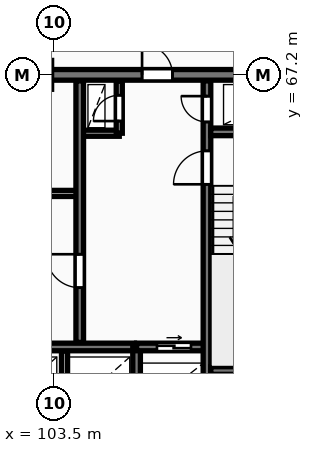
"""IFC4 building model, lengths in metres.
Left out: names, types, materials, properties, quantities, classifications, styles, units other than length and angle.
Written with IfcOpenShell. Run it as: python <this file> out.ifc"""

import sys

from ifc_helpers import new_model, si_unit, direction, frame, frame_2d, origin, place, context, subcontext, project, spatial, rectangle, extrude, element, fill, save


model = new_model("IFC4")
c1 = context("Model", 3, precision=1e-05, world=origin(), true_north=direction((0.0, 1.0)))
c2 = subcontext(c1, "Body", "Model", "MODEL_VIEW")
j1 = project(units=[si_unit("LENGTHUNIT", "METRE"), si_unit("PLANEANGLEUNIT", "RADIAN")], contexts=[c1])
p1 = place(None, origin())
s1 = spatial("IfcSite", under=j1, at=p1, CompositionType="ELEMENT")
p2 = place(p1, origin())
s2 = spatial("IfcBuilding", under=s1, at=p2, CompositionType="ELEMENT")
p3 = place(p2, frame((0.0, 0.0, 24.0)))
s3 = spatial("IfcBuildingStorey", under=s2, at=p3, CompositionType="ELEMENT", Elevation=24.0)
p4 = place(p3, frame((75.95, 67.2, 0.0), z_axis=(0.0, 0.0, 1.0), x_axis=(1.0, 0.0, 0.0)))
e1 = element("IfcWall", 1, at=p4, inside=s3, PredefinedType="SHEAR", context=c2, shape_type="SweptSolid", body=[
    extrude(rectangle(XDim=36.3, YDim=0.35, at=frame_2d((18.15, 0.0))), origin(), (0.0, 0.0, 1.0), 3.25),
])
p5 = place(p4, frame((5.25, 0.0, 0.0)))
e2 = element("IfcOpeningElement", 2, at=p5, cuts=e1, PredefinedType="OPENING", context=c2, shape_type="SweptSolid", body=[
    extrude(rectangle(XDim=1.0, YDim=2.15, at=frame_2d((0.5, 1.075))), frame((0.0, 0.185, 0.0), z_axis=(0.0, -1.0, 0.0), x_axis=(1.0, 0.0, 0.0)), (0.0, 0.0, 1.0), 0.37),
])
p6 = place(p4, frame((21.6, 0.0, 0.0)))
e3 = element("IfcOpeningElement", 3, at=p6, cuts=e1, PredefinedType="OPENING", context=c2, shape_type="SweptSolid", body=[
    extrude(rectangle(XDim=1.5, YDim=2.2, at=frame_2d((0.75, 1.1))), frame((0.0, 0.185, 0.0), z_axis=(0.0, -1.0, 0.0), x_axis=(1.0, 0.0, 0.0)), (0.0, 0.0, 1.0), 0.37),
])
p7 = place(p4, frame((30.45, 0.0, 0.0)))
e4 = element("IfcOpeningElement", 4, at=p7, cuts=e1, PredefinedType="OPENING", context=c2, shape_type="SweptSolid", body=[
    extrude(rectangle(XDim=1.0, YDim=2.15, at=frame_2d((0.5, 1.075))), frame((0.0, 0.185, 0.0), z_axis=(0.0, -1.0, 0.0), x_axis=(1.0, 0.0, 0.0)), (0.0, 0.0, 1.0), 0.37),
])
p8 = place(p3, frame((103.85, 55.4, 0.0), z_axis=(0.0, 0.0, 1.0), x_axis=(0.0, 1.0, 0.0)))
e5 = element("IfcWall", 5, at=p8, inside=s3, PredefinedType="PARTITIONING", context=c2, shape_type="SweptSolid", body=[
    extrude(rectangle(XDim=2.72, YDim=0.2, at=frame_2d((1.36, 0.0))), origin(), (0.0, 0.0, 1.0), 2.97),
])
p9 = place(p3, frame((101.55, 58.25, 0.0), z_axis=(0.0, 0.0, 1.0), x_axis=(1.0, 0.0, 0.0)))
e6 = element("IfcWall", 6, at=p9, inside=s3, PredefinedType="SHEAR", context=c2, shape_type="SweptSolid", body=[
    extrude(rectangle(XDim=4.6, YDim=0.25, at=frame_2d((2.3, 0.0))), origin(), (0.0, 0.0, 1.0), 3.25),
])
p10 = place(p3, frame((106.22, 55.4, 0.0), z_axis=(0.0, 0.0, 1.0), x_axis=(0.0, 1.0, 0.0)))
e7 = element("IfcWall", 7, at=p10, inside=s3, PredefinedType="SHEAR", context=c2, shape_type="SweptSolid", body=[
    extrude(rectangle(XDim=2.85, YDim=0.25, at=frame_2d((1.425, 0.0))), origin(), (0.0, 0.0, 1.0), 3.25),
])
p11 = place(p3, frame((106.22, 58.25, 0.0), z_axis=(0.0, 0.0, 1.0), x_axis=(1.0, 0.0, 0.0)))
e8 = element("IfcWall", 8, at=p11, inside=s3, PredefinedType="SHEAR", context=c2, shape_type="SweptSolid", body=[
    extrude(rectangle(XDim=2.46, YDim=0.25, at=frame_2d((1.23, 0.0))), origin(), (0.0, 0.0, 1.0), 3.25),
])
p12 = place(p11, frame((0.67, 0.0, 0.0)))
e9 = element("IfcOpeningElement", 9, at=p12, cuts=e8, PredefinedType="OPENING", context=c2, shape_type="SweptSolid", body=[
    extrude(rectangle(XDim=1.12, YDim=2.12, at=frame_2d((0.56, 1.06))), frame((0.0, 0.135, 0.0), z_axis=(0.0, -1.0, 0.0), x_axis=(1.0, 0.0, 0.0)), (0.0, 0.0, 1.0), 0.27),
])
p13 = place(p3, frame((84.42, 63.3, 0.0), z_axis=(0.0, 0.0, 1.0), x_axis=(1.0, 0.0, 0.0)))
e10 = element("IfcWall", 10, at=p13, inside=s3, PredefinedType="PARTITIONING", context=c2, shape_type="SweptSolid", body=[
    extrude(rectangle(XDim=19.83, YDim=0.2, at=frame_2d((9.915, 0.0))), origin(), (0.0, 0.0, 1.0), 2.97),
])
p14 = place(p13, frame((1.15, 0.0, 0.0)))
e11 = element("IfcOpeningElement", 11, at=p14, cuts=e10, PredefinedType="OPENING", context=c2, shape_type="SweptSolid", body=[
    extrude(rectangle(XDim=0.85, YDim=2.05, at=frame_2d((0.425, 1.025))), frame((0.0, 0.11, 0.0), z_axis=(0.0, -1.0, 0.0), x_axis=(1.0, 0.0, 0.0)), (0.0, 0.0, 1.0), 0.22),
])
p15 = place(p13, frame((3.25, 0.0, 0.0)))
e12 = element("IfcOpeningElement", 12, at=p15, cuts=e10, PredefinedType="OPENING", context=c2, shape_type="SweptSolid", body=[
    extrude(rectangle(XDim=0.85, YDim=2.05, at=frame_2d((0.425, 1.025))), frame((0.0, 0.11, 0.0), z_axis=(0.0, -1.0, 0.0), x_axis=(1.0, 0.0, 0.0)), (0.0, 0.0, 1.0), 0.22),
])
p16 = place(p13, frame((13.08, 0.0, 0.0)))
e13 = element("IfcOpeningElement", 13, at=p16, cuts=e10, PredefinedType="OPENING", context=c2, shape_type="SweptSolid", body=[
    extrude(rectangle(XDim=1.5, YDim=2.2, at=frame_2d((0.75, 1.1))), frame((0.0, 0.11, 0.0), z_axis=(0.0, -1.0, 0.0), x_axis=(1.0, 0.0, 0.0)), (0.0, 0.0, 1.0), 0.22),
])
p17 = place(p13, frame((6.68, 0.0, 0.0)))
e14 = element("IfcOpeningElement", 14, at=p17, cuts=e10, PredefinedType="OPENING", context=c2, shape_type="SweptSolid", body=[
    extrude(rectangle(XDim=0.92, YDim=2.08, at=frame_2d((0.46, 1.04))), frame((0.0, 0.11, 0.0), z_axis=(0.0, -1.0, 0.0), x_axis=(1.0, 0.0, 0.0)), (0.0, 0.0, 1.0), 0.22),
])
p18 = place(p13, frame((16.33, 0.0, 0.0)))
e15 = element("IfcOpeningElement", 15, at=p18, cuts=e10, PredefinedType="OPENING", context=c2, shape_type="SweptSolid", body=[
    extrude(rectangle(XDim=0.88, YDim=2.06, at=frame_2d((0.44, 1.03))), frame((0.0, 0.11, 0.0), z_axis=(0.0, -1.0, 0.0), x_axis=(1.0, 0.0, 0.0)), (0.0, 0.0, 1.0), 0.22),
])
p19 = place(p3, frame((104.45, 65.28, 0.0), z_axis=(0.0, 0.0, 1.0), x_axis=(1.0, 0.0, 0.0)))
e16 = element("IfcWall", 16, at=p19, inside=s3, PredefinedType="PARTITIONING", context=c2, shape_type="SweptSolid", body=[
    extrude(rectangle(XDim=1.2, YDim=0.2, at=frame_2d((0.6, 0.0))), origin(), (0.0, 0.0, 1.0), 2.97),
])
p20 = place(p3, frame((105.65, 65.28, 0.0), z_axis=(0.0, 0.0, 1.0), x_axis=(0.0, 1.0, 0.0)))
e17 = element("IfcWall", 17, at=p20, inside=s3, PredefinedType="PARTITIONING", context=c2, shape_type="SweptSolid", body=[
    extrude(rectangle(XDim=1.72, YDim=0.2, at=frame_2d((0.86, 0.0))), origin(), (0.0, 0.0, 1.0), 2.97),
])
p21 = place(p20, frame((0.4, 0.0, 0.0)))
e18 = element("IfcOpeningElement", 18, at=p21, cuts=e17, PredefinedType="OPENING", context=c2, shape_type="SweptSolid", body=[
    extrude(rectangle(XDim=0.85, YDim=2.05, at=frame_2d((0.425, 1.025))), frame((0.0, 0.11, 0.0), z_axis=(0.0, -1.0, 0.0), x_axis=(1.0, 0.0, 0.0)), (0.0, 0.0, 1.0), 0.22),
])
p22 = place(p3, frame((104.35, 58.4, 0.0), z_axis=(0.0, 0.0, 1.0), x_axis=(0.0, 1.0, 0.0)))
e19 = element("IfcWall", 19, at=p22, inside=s3, PredefinedType="SHEAR", context=c2, shape_type="SweptSolid", body=[
    extrude(rectangle(XDim=8.6, YDim=0.25, at=frame_2d((4.3, 0.0))), origin(), (0.0, 0.0, 1.0), 3.25),
])
p23 = place(p22, frame((1.8, 0.0, 0.0)))
e20 = element("IfcOpeningElement", 20, at=p23, cuts=e19, PredefinedType="OPENING", context=c2, shape_type="SweptSolid", body=[
    extrude(rectangle(XDim=1.1, YDim=2.1, at=frame_2d((0.55, 1.05))), frame((0.0, 0.135, 0.0), z_axis=(0.0, -1.0, 0.0), x_axis=(1.0, 0.0, 0.0)), (0.0, 0.0, 1.0), 0.27),
])
p24 = place(p3, frame((108.535, 55.4, 0.0), z_axis=(0.0, 0.0, 1.0), x_axis=(0.0, 1.0, 0.0)))
e21 = element("IfcWall", 21, at=p24, inside=s3, PredefinedType="SHEAR", context=c2, shape_type="SweptSolid", body=[
    extrude(rectangle(XDim=11.6, YDim=0.25, at=frame_2d((5.8, 0.0))), origin(), (0.0, 0.0, 1.0), 3.25),
])
p25 = place(p24, frame((8.2, 0.0, 0.0)))
e22 = element("IfcOpeningElement", 22, at=p25, cuts=e21, PredefinedType="OPENING", context=c2, shape_type="SweptSolid", body=[
    extrude(rectangle(XDim=1.1, YDim=2.1, at=frame_2d((0.55, 1.05))), frame((0.0, 0.135, 0.0), z_axis=(0.0, -1.0, 0.0), x_axis=(1.0, 0.0, 0.0)), (0.0, 0.0, 1.0), 0.27),
])
p26 = place(p24, frame((10.25, 0.0, 0.0)))
e23 = element("IfcOpeningElement", 23, at=p26, cuts=e21, PredefinedType="OPENING", context=c2, shape_type="SweptSolid", body=[
    extrude(rectangle(XDim=0.85, YDim=2.05, at=frame_2d((0.425, 1.025))), frame((0.0, 0.135, 0.0), z_axis=(0.0, -1.0, 0.0), x_axis=(1.0, 0.0, 0.0)), (0.0, 0.0, 1.0), 0.27),
])
for number, where, z_axis, x_axis in (
    (24, (108.66, 57.475, 0.0), (0.0, 0.0, 1.0), (1.0, 0.0, 0.0)),
    (25, (108.66, 65.325, 0.0), (0.0, 0.0, 1.0), (1.0, 0.0, 0.0)),
):
    element("IfcWall", number, at=place(p3, frame(where, z_axis=z_axis, x_axis=x_axis)), inside=s3, PredefinedType="SHEAR", context=c2, shape_type="SweptSolid", body=[
        extrude(rectangle(XDim=3.24, YDim=0.25, at=frame_2d((1.62, 0.0))), origin(), (0.0, 0.0, 1.0), 3.25),
    ])
p27 = place(p7, origin())
e26 = element("IfcDoor", 26, at=p27, inside=s3, OperationType="SINGLE_SWING_LEFT", PredefinedType="DOOR", context=c2, shape_type="SweptSolid", body=[
    extrude(rectangle(XDim=1.0, YDim=2.15, at=frame_2d((0.5, 1.075))), frame((0.0, 0.025, 0.0), z_axis=(0.0, -1.0, 0.0), x_axis=(1.0, 0.0, 0.0)), (0.0, 0.0, 1.0), 0.05),
])
fill(e4, e26)
p28 = place(p12, origin())
e27 = element("IfcDoor", 27, at=p28, inside=s3, OperationType="SLIDING_TO_RIGHT", PredefinedType="DOOR", context=c2, shape_type="SweptSolid", body=[
    extrude(rectangle(XDim=1.12, YDim=2.12, at=frame_2d((0.56, 1.06))), frame((0.0, 0.025, 0.0), z_axis=(0.0, -1.0, 0.0), x_axis=(1.0, 0.0, 0.0)), (0.0, 0.0, 1.0), 0.05),
])
fill(e9, e27)
p29 = place(p21, origin())
e28 = element("IfcDoor", 28, at=p29, inside=s3, OperationType="SINGLE_SWING_LEFT", PredefinedType="DOOR", context=c2, shape_type="SweptSolid", body=[
    extrude(rectangle(XDim=0.85, YDim=2.05, at=frame_2d((0.425, 1.025))), frame((0.0, 0.025, 0.0), z_axis=(0.0, -1.0, 0.0), x_axis=(1.0, 0.0, 0.0)), (0.0, 0.0, 1.0), 0.05),
])
fill(e18, e28)
p30 = place(p23, origin())
e29 = element("IfcDoor", 29, at=p30, inside=s3, OperationType="SINGLE_SWING_RIGHT", PredefinedType="DOOR", context=c2, shape_type="SweptSolid", body=[
    extrude(rectangle(XDim=1.1, YDim=2.1, at=frame_2d((0.55, 1.05))), frame((0.0, 0.025, 0.0), z_axis=(0.0, -1.0, 0.0), x_axis=(1.0, 0.0, 0.0)), (0.0, 0.0, 1.0), 0.05),
])
fill(e20, e29)
p31 = place(p25, origin())
e30 = element("IfcDoor", 30, at=p31, inside=s3, OperationType="SINGLE_SWING_LEFT", PredefinedType="DOOR", context=c2, shape_type="SweptSolid", body=[
    extrude(rectangle(XDim=1.1, YDim=2.1, at=frame_2d((0.55, 1.05))), frame((0.0, 0.025, 0.0), z_axis=(0.0, -1.0, 0.0), x_axis=(1.0, 0.0, 0.0)), (0.0, 0.0, 1.0), 0.05),
])
fill(e22, e30)
p32 = place(p26, origin())
e31 = element("IfcDoor", 31, at=p32, inside=s3, OperationType="SINGLE_SWING_RIGHT", PredefinedType="DOOR", context=c2, shape_type="SweptSolid", body=[
    extrude(rectangle(XDim=0.85, YDim=2.05, at=frame_2d((0.425, 1.025))), frame((0.0, 0.025, 0.0), z_axis=(0.0, -1.0, 0.0), x_axis=(1.0, 0.0, 0.0)), (0.0, 0.0, 1.0), 0.05),
])
fill(e23, e31)
save(model, sys.argv[1])
